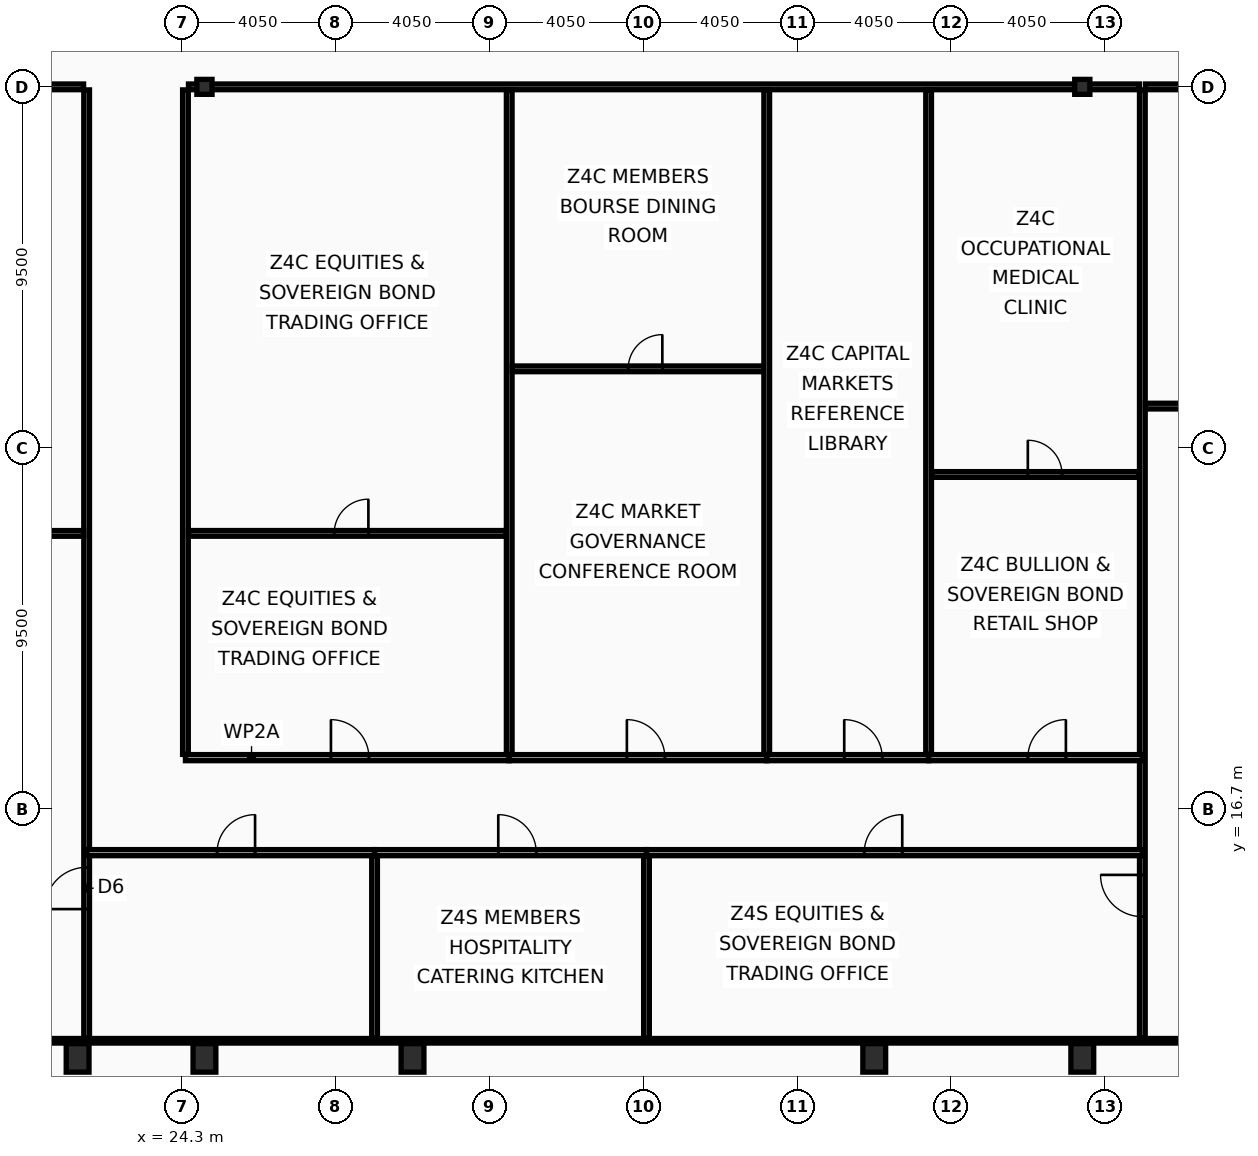
"""IFC4 building model, lengths in metres.
Left out: names, types, materials, properties, quantities, classifications, styles, units other than length and angle.
Written with IfcOpenShell. Run it as: python <this file> out.ifc"""

import sys

from ifc_helpers import new_model, si_unit, direction, frame, frame_2d, origin, origin_2d, place, context, subcontext, project, spatial, rectangle, hollow_rectangle, i_section, extrude, element, fill, save


model = new_model("IFC4")
c1 = context("Model", 3, precision=1e-05, world=origin(), true_north=direction((0.0, 1.0)))
c2 = subcontext(c1, "Body", "Model", "MODEL_VIEW")
j1 = project(units=[si_unit("LENGTHUNIT", "METRE"), si_unit("PLANEANGLEUNIT", "RADIAN")], contexts=[c1])
p1 = place(None, origin())
s1 = spatial("IfcSite", under=j1, at=p1, CompositionType="ELEMENT")
p2 = place(p1, origin())
s2 = spatial("IfcBuilding", under=s1, at=p2, CompositionType="ELEMENT")
p3 = place(p2, frame((0.0, 0.0, 277.0)))
s3 = spatial("IfcBuildingStorey", under=s2, at=p3, CompositionType="ELEMENT", Elevation=277.0)
for number, where, z_axis, x_axis in (
    (1, (21.562, 10.15, 0.0), (0.0, 0.0, 1.0), (1.0, 0.0, 0.0)),
    (2, (24.9, 10.15, 0.0), (0.0, 0.0, 1.0), (1.0, 0.0, 0.0)),
    (3, (30.375, 10.15, 0.0), (0.0, 0.0, 1.0), (1.0, 0.0, 0.0)),
    (4, (42.525, 10.15, 0.0), (0.0, 0.0, 1.0), (1.0, 0.0, 0.0)),
    (5, (48.0, 10.15, 0.0), (0.0, 0.0, 1.0), (1.0, 0.0, 0.0)),
):
    element("IfcColumn", number, at=place(p3, frame(where, z_axis=z_axis, x_axis=x_axis)), inside=s3, PredefinedType="COLUMN", context=c2, shape_type="SweptSolid", body=[
        extrude(hollow_rectangle(XDim=0.6, YDim=0.75, WallThickness=0.045, at=origin_2d()), origin(), (0.0, 0.0, 1.0), 3.6),
    ])
for number, where, z_axis, x_axis in (
    (6, (24.9, 35.7, 0.0), (0.0, 0.0, 1.0), (1.0, 0.0, 0.0)),
    (7, (48.0, 35.7, 0.0), (0.0, 0.0, 1.0), (1.0, 0.0, 0.0)),
):
    element("IfcColumn", number, at=place(p3, frame(where, z_axis=z_axis, x_axis=x_axis)), inside=s3, PredefinedType="COLUMN", context=c2, shape_type="SweptSolid", body=[
        extrude(i_section(OverallWidth=0.399, OverallDepth=0.393, WebThickness=0.023, FlangeThickness=0.037, at=origin_2d()), origin(), (0.0, 0.0, 1.0), 3.6),
    ])
p4 = place(p3, frame((21.8, 10.665, 0.0), z_axis=(0.0, 0.0, 1.0), x_axis=(0.0, 1.0, 0.0)))
e8 = element("IfcWall", 8, at=p4, inside=s3, PredefinedType="PARTITIONING", context=c2, shape_type="SweptSolid", body=[
    extrude(rectangle(XDim=24.955, YDim=0.15, at=frame_2d((12.478, 0.0))), origin(), (0.0, 0.0, 1.0), 3.03),
])
p5 = place(p4, frame((3.4, 0.0, 0.0)))
e9 = element("IfcOpeningElement", 9, at=p5, cuts=e8, PredefinedType="OPENING", context=c2, shape_type="SweptSolid", body=[
    extrude(rectangle(XDim=1.1, YDim=2.1, at=frame_2d((0.55, 1.05))), frame((0.0, 0.085, 0.0), z_axis=(0.0, -1.0, 0.0), x_axis=(1.0, 0.0, 0.0)), (0.0, 0.0, 1.0), 0.17),
])
p6 = place(p3, frame((10.095, 35.7, 0.0), z_axis=(0.0, 0.0, 1.0), x_axis=(1.0, 0.0, 0.0)))
e10 = element("IfcWall", 10, at=p6, inside=s3, PredefinedType="PARTITIONING", context=c2, shape_type="SweptSolid", body=[
    extrude(rectangle(XDim=11.625, YDim=0.15, at=frame_2d((5.812, 0.0))), origin(), (0.0, 0.0, 1.0), 2.78),
])
p7 = place(p6, frame((2.8, 0.0, 0.0)))
e11 = element("IfcOpeningElement", 11, at=p7, cuts=e10, PredefinedType="OPENING", context=c2, shape_type="SweptSolid", body=[
    extrude(rectangle(XDim=1.0, YDim=2.05, at=frame_2d((0.5, 1.025))), frame((0.0, 0.085, 0.0), z_axis=(0.0, -1.0, 0.0), x_axis=(1.0, 0.0, 0.0)), (0.0, 0.0, 1.0), 0.17),
])
p8 = place(p3, frame((10.095, 23.95, 0.0), z_axis=(0.0, 0.0, 1.0), x_axis=(1.0, 0.0, 0.0)))
e12 = element("IfcWall", 12, at=p8, inside=s3, PredefinedType="PARTITIONING", context=c2, shape_type="SweptSolid", body=[
    extrude(rectangle(XDim=11.625, YDim=0.15, at=frame_2d((5.812, 0.0))), origin(), (0.0, 0.0, 1.0), 2.78),
])
p9 = place(p8, frame((2.2, 0.0, 0.0)))
e13 = element("IfcOpeningElement", 13, at=p9, cuts=e12, PredefinedType="OPENING", context=c2, shape_type="SweptSolid", body=[
    extrude(rectangle(XDim=0.9, YDim=2.05, at=frame_2d((0.45, 1.025))), frame((0.0, 0.085, 0.0), z_axis=(0.0, -1.0, 0.0), x_axis=(1.0, 0.0, 0.0)), (0.0, 0.0, 1.0), 0.17),
])
p10 = place(p3, frame((24.4, 18.135, 0.0), z_axis=(0.0, 0.0, 1.0), x_axis=(0.0, 1.0, 0.0)))
e14 = element("IfcWall", 14, at=p10, inside=s3, PredefinedType="PARTITIONING", context=c2, shape_type="SweptSolid", body=[
    extrude(rectangle(XDim=17.485, YDim=0.15, at=frame_2d((8.743, 0.0))), origin(), (0.0, 0.0, 1.0), 2.78),
])
p11 = place(p3, frame((49.58, 10.665, 0.0), z_axis=(0.0, 0.0, 1.0), x_axis=(0.0, 1.0, 0.0)))
e15 = element("IfcWall", 15, at=p11, inside=s3, PredefinedType="PARTITIONING", context=c2, shape_type="SweptSolid", body=[
    extrude(rectangle(XDim=24.955, YDim=0.15, at=frame_2d((12.478, 0.0))), origin(), (0.0, 0.0, 1.0), 3.03),
])
p12 = place(p11, frame((3.2, 0.0, 0.0)))
e16 = element("IfcOpeningElement", 16, at=p12, cuts=e15, PredefinedType="OPENING", context=c2, shape_type="SweptSolid", body=[
    extrude(rectangle(XDim=1.1, YDim=2.1, at=frame_2d((0.55, 1.05))), frame((0.0, 0.085, 0.0), z_axis=(0.0, -1.0, 0.0), x_axis=(1.0, 0.0, 0.0)), (0.0, 0.0, 1.0), 0.17),
])
p13 = place(p3, frame((24.48, 35.7, 0.0), z_axis=(0.0, 0.0, 1.0), x_axis=(1.0, 0.0, 0.0)))
e17 = element("IfcWall", 17, at=p13, inside=s3, PredefinedType="PARTITIONING", context=c2, shape_type="SweptSolid", body=[
    extrude(rectangle(XDim=25.02, YDim=0.15, at=frame_2d((12.51, 0.0))), origin(), (0.0, 0.0, 1.0), 2.78),
])
p14 = place(p3, frame((49.66, 35.7, 0.0), z_axis=(0.0, 0.0, 1.0), x_axis=(1.0, 0.0, 0.0)))
e18 = element("IfcWall", 18, at=p14, inside=s3, PredefinedType="PARTITIONING", context=c2, shape_type="SweptSolid", body=[
    extrude(rectangle(XDim=13.145, YDim=0.15, at=frame_2d((6.573, 0.0))), origin(), (0.0, 0.0, 1.0), 2.78),
])
p15 = place(p14, frame((2.2, 0.0, 0.0)))
e19 = element("IfcOpeningElement", 19, at=p15, cuts=e18, PredefinedType="OPENING", context=c2, shape_type="SweptSolid", body=[
    extrude(rectangle(XDim=1.0, YDim=2.05, at=frame_2d((0.5, 1.025))), frame((0.0, 0.085, 0.0), z_axis=(0.0, -1.0, 0.0), x_axis=(1.0, 0.0, 0.0)), (0.0, 0.0, 1.0), 0.17),
])
p16 = place(p3, frame((49.66, 27.3, 0.0), z_axis=(0.0, 0.0, 1.0), x_axis=(1.0, 0.0, 0.0)))
e20 = element("IfcWall", 20, at=p16, inside=s3, PredefinedType="PARTITIONING", context=c2, shape_type="SweptSolid", body=[
    extrude(rectangle(XDim=13.145, YDim=0.15, at=frame_2d((6.573, 0.0))), origin(), (0.0, 0.0, 1.0), 2.78),
])
p17 = place(p16, frame((2.2, 0.0, 0.0)))
e21 = element("IfcOpeningElement", 21, at=p17, cuts=e20, PredefinedType="OPENING", context=c2, shape_type="SweptSolid", body=[
    extrude(rectangle(XDim=0.9, YDim=2.05, at=frame_2d((0.45, 1.025))), frame((0.0, 0.085, 0.0), z_axis=(0.0, -1.0, 0.0), x_axis=(1.0, 0.0, 0.0)), (0.0, 0.0, 1.0), 0.17),
])
p18 = place(p3, frame((24.4, 18.05, 0.0), z_axis=(0.0, 0.0, 1.0), x_axis=(1.0, 0.0, 0.0)))
e22 = element("IfcWall", 22, at=p18, inside=s3, PredefinedType="PARTITIONING", context=c2, shape_type="SweptSolid", body=[
    extrude(rectangle(XDim=8.52, YDim=0.16, at=frame_2d((4.26, 0.0))), origin(), (0.0, 0.0, 1.0), 2.78),
])
p19 = place(p18, frame((3.828, 0.0, 0.0)))
e23 = element("IfcOpeningElement", 23, at=p19, cuts=e22, PredefinedType="OPENING", context=c2, shape_type="SweptSolid", body=[
    extrude(rectangle(XDim=1.0, YDim=2.05, at=frame_2d((0.5, 1.025))), frame((0.0, 0.09, 0.0), z_axis=(0.0, -1.0, 0.0), x_axis=(1.0, 0.0, 0.0)), (0.0, 0.0, 1.0), 0.18),
])
p20 = place(p3, frame((24.48, 23.951, 0.0), z_axis=(0.0, 0.0, 1.0), x_axis=(1.0, 0.0, 0.0)))
e24 = element("IfcWall", 24, at=p20, inside=s3, PredefinedType="PARTITIONING", context=c2, shape_type="SweptSolid", body=[
    extrude(rectangle(XDim=8.36, YDim=0.15, at=frame_2d((4.18, 0.0))), origin(), (0.0, 0.0, 1.0), 2.78),
])
p21 = place(p20, frame((3.834, 0.0, 0.0)))
e25 = element("IfcOpeningElement", 25, at=p21, cuts=e24, PredefinedType="OPENING", context=c2, shape_type="SweptSolid", body=[
    extrude(rectangle(XDim=0.9, YDim=2.05, at=frame_2d((0.45, 1.025))), frame((0.0, 0.085, 0.0), z_axis=(0.0, -1.0, 0.0), x_axis=(1.0, 0.0, 0.0)), (0.0, 0.0, 1.0), 0.17),
])
p22 = place(p3, frame((32.92, 18.05, 0.0), z_axis=(0.0, 0.0, 1.0), x_axis=(1.0, 0.0, 0.0)))
e26 = element("IfcWall", 26, at=p22, inside=s3, PredefinedType="PARTITIONING", context=c2, shape_type="SweptSolid", body=[
    extrude(rectangle(XDim=6.776, YDim=0.16, at=frame_2d((3.388, 0.0))), origin(), (0.0, 0.0, 1.0), 3.44),
])
p23 = place(p22, frame((3.096, 0.0, 0.0)))
e27 = element("IfcOpeningElement", 27, at=p23, cuts=e26, PredefinedType="OPENING", context=c2, shape_type="SweptSolid", body=[
    extrude(rectangle(XDim=1.0, YDim=2.05, at=frame_2d((0.5, 1.025))), frame((0.0, 0.09, 0.0), z_axis=(0.0, -1.0, 0.0), x_axis=(1.0, 0.0, 0.0)), (0.0, 0.0, 1.0), 0.18),
])
p24 = place(p3, frame((32.92, 18.135, 0.0), z_axis=(0.0, 0.0, 1.0), x_axis=(0.0, 1.0, 0.0)))
e28 = element("IfcWall", 28, at=p24, inside=s3, PredefinedType="PARTITIONING", context=c2, shape_type="SweptSolid", body=[
    extrude(rectangle(XDim=17.485, YDim=0.15, at=frame_2d((8.743, 0.0))), origin(), (0.0, 0.0, 1.0), 3.03),
])
p25 = place(p3, frame((33.0, 28.28, 0.0), z_axis=(0.0, 0.0, 1.0), x_axis=(1.0, 0.0, 0.0)))
e29 = element("IfcWall", 29, at=p25, inside=s3, PredefinedType="PARTITIONING", context=c2, shape_type="SweptSolid", body=[
    extrude(rectangle(XDim=6.616, YDim=0.15, at=frame_2d((3.308, 0.0))), origin(), (0.0, 0.0, 1.0), 3.44),
])
p26 = place(p25, frame((3.049, 0.0, 0.0)))
e30 = element("IfcOpeningElement", 30, at=p26, cuts=e29, PredefinedType="OPENING", context=c2, shape_type="SweptSolid", body=[
    extrude(rectangle(XDim=0.9, YDim=2.05, at=frame_2d((0.45, 1.025))), frame((0.0, 0.085, 0.0), z_axis=(0.0, -1.0, 0.0), x_axis=(1.0, 0.0, 0.0)), (0.0, 0.0, 1.0), 0.17),
])
p27 = place(p3, frame((39.696, 18.05, 0.0), z_axis=(0.0, 0.0, 1.0), x_axis=(1.0, 0.0, 0.0)))
e31 = element("IfcWall", 31, at=p27, inside=s3, PredefinedType="PARTITIONING", context=c2, shape_type="SweptSolid", body=[
    extrude(rectangle(XDim=4.26, YDim=0.16, at=frame_2d((2.13, 0.0))), origin(), (0.0, 0.0, 1.0), 2.78),
])
p28 = place(p27, frame((2.039, 0.0, 0.0)))
e32 = element("IfcOpeningElement", 32, at=p28, cuts=e31, PredefinedType="OPENING", context=c2, shape_type="SweptSolid", body=[
    extrude(rectangle(XDim=1.0, YDim=2.05, at=frame_2d((0.5, 1.025))), frame((0.0, 0.09, 0.0), z_axis=(0.0, -1.0, 0.0), x_axis=(1.0, 0.0, 0.0)), (0.0, 0.0, 1.0), 0.18),
])
p29 = place(p3, frame((39.696, 18.135, 0.0), z_axis=(0.0, 0.0, 1.0), x_axis=(0.0, 1.0, 0.0)))
e33 = element("IfcWall", 33, at=p29, inside=s3, PredefinedType="PARTITIONING", context=c2, shape_type="SweptSolid", body=[
    extrude(rectangle(XDim=17.485, YDim=0.15, at=frame_2d((8.743, 0.0))), origin(), (0.0, 0.0, 1.0), 3.03),
])
p30 = place(p3, frame((43.956, 18.05, 0.0), z_axis=(0.0, 0.0, 1.0), x_axis=(1.0, 0.0, 0.0)))
e34 = element("IfcWall", 34, at=p30, inside=s3, PredefinedType="PARTITIONING", context=c2, shape_type="SweptSolid", body=[
    extrude(rectangle(XDim=5.624, YDim=0.16, at=frame_2d((2.812, 0.0))), origin(), (0.0, 0.0, 1.0), 2.78),
])
p31 = place(p30, frame((2.612, 0.0, 0.0)))
e35 = element("IfcOpeningElement", 35, at=p31, cuts=e34, PredefinedType="OPENING", context=c2, shape_type="SweptSolid", body=[
    extrude(rectangle(XDim=1.0, YDim=2.05, at=frame_2d((0.5, 1.025))), frame((0.0, 0.09, 0.0), z_axis=(0.0, -1.0, 0.0), x_axis=(1.0, 0.0, 0.0)), (0.0, 0.0, 1.0), 0.18),
])
p32 = place(p3, frame((43.956, 18.135, 0.0), z_axis=(0.0, 0.0, 1.0), x_axis=(0.0, 1.0, 0.0)))
e36 = element("IfcWall", 36, at=p32, inside=s3, PredefinedType="PARTITIONING", context=c2, shape_type="SweptSolid", body=[
    extrude(rectangle(XDim=17.485, YDim=0.15, at=frame_2d((8.743, 0.0))), origin(), (0.0, 0.0, 1.0), 3.03),
])
p33 = place(p3, frame((44.036, 25.501, 0.0), z_axis=(0.0, 0.0, 1.0), x_axis=(1.0, 0.0, 0.0)))
e37 = element("IfcWall", 37, at=p33, inside=s3, PredefinedType="PARTITIONING", context=c2, shape_type="SweptSolid", body=[
    extrude(rectangle(XDim=5.464, YDim=0.15, at=frame_2d((2.732, 0.0))), origin(), (0.0, 0.0, 1.0), 2.78),
])
p34 = place(p33, frame((2.531, 0.0, 0.0)))
e38 = element("IfcOpeningElement", 38, at=p34, cuts=e37, PredefinedType="OPENING", context=c2, shape_type="SweptSolid", body=[
    extrude(rectangle(XDim=0.9, YDim=2.05, at=frame_2d((0.45, 1.025))), frame((0.0, 0.085, 0.0), z_axis=(0.0, -1.0, 0.0), x_axis=(1.0, 0.0, 0.0)), (0.0, 0.0, 1.0), 0.17),
])
p35 = place(p3, frame((21.8, 15.55, 0.0), z_axis=(0.0, 0.0, 1.0), x_axis=(1.0, 0.0, 0.0)))
e39 = element("IfcWall", 39, at=p35, inside=s3, PredefinedType="PARTITIONING", context=c2, shape_type="SweptSolid", body=[
    extrude(rectangle(XDim=7.576, YDim=0.16, at=frame_2d((3.788, 0.0))), origin(), (0.0, 0.0, 1.0), 2.78),
])
p36 = place(p35, frame((3.432, 0.0, 0.0)))
e40 = element("IfcOpeningElement", 40, at=p36, cuts=e39, PredefinedType="OPENING", context=c2, shape_type="SweptSolid", body=[
    extrude(rectangle(XDim=1.0, YDim=2.05, at=frame_2d((0.5, 1.025))), frame((0.0, 0.09, 0.0), z_axis=(0.0, -1.0, 0.0), x_axis=(1.0, 0.0, 0.0)), (0.0, 0.0, 1.0), 0.18),
])
p37 = place(p3, frame((29.376, 15.55, 0.0), z_axis=(0.0, 0.0, 1.0), x_axis=(1.0, 0.0, 0.0)))
e41 = element("IfcWall", 41, at=p37, inside=s3, PredefinedType="PARTITIONING", context=c2, shape_type="SweptSolid", body=[
    extrude(rectangle(XDim=7.155, YDim=0.16, at=frame_2d((3.578, 0.0))), origin(), (0.0, 0.0, 1.0), 2.78),
])
p38 = place(p37, frame((3.255, 0.0, 0.0)))
e42 = element("IfcOpeningElement", 42, at=p38, cuts=e41, PredefinedType="OPENING", context=c2, shape_type="SweptSolid", body=[
    extrude(rectangle(XDim=1.0, YDim=2.05, at=frame_2d((0.5, 1.025))), frame((0.0, 0.09, 0.0), z_axis=(0.0, -1.0, 0.0), x_axis=(1.0, 0.0, 0.0)), (0.0, 0.0, 1.0), 0.18),
])
p39 = place(p3, frame((29.376, 10.665, 0.0), z_axis=(0.0, 0.0, 1.0), x_axis=(0.0, 1.0, 0.0)))
e43 = element("IfcWall", 43, at=p39, inside=s3, PredefinedType="PARTITIONING", context=c2, shape_type="SweptSolid", body=[
    extrude(rectangle(XDim=4.8, YDim=0.15, at=frame_2d((2.4, 0.0))), origin(), (0.0, 0.0, 1.0), 3.44),
])
p40 = place(p3, frame((36.532, 15.55, 0.0), z_axis=(0.0, 0.0, 1.0), x_axis=(1.0, 0.0, 0.0)))
e44 = element("IfcWall", 44, at=p40, inside=s3, PredefinedType="PARTITIONING", context=c2, shape_type="SweptSolid", body=[
    extrude(rectangle(XDim=13.048, YDim=0.16, at=frame_2d((6.524, 0.0))), origin(), (0.0, 0.0, 1.0), 2.78),
])
p41 = place(p40, frame((5.73, 0.0, 0.0)))
e45 = element("IfcOpeningElement", 45, at=p41, cuts=e44, PredefinedType="OPENING", context=c2, shape_type="SweptSolid", body=[
    extrude(rectangle(XDim=1.0, YDim=2.05, at=frame_2d((0.5, 1.025))), frame((0.0, 0.09, 0.0), z_axis=(0.0, -1.0, 0.0), x_axis=(1.0, 0.0, 0.0)), (0.0, 0.0, 1.0), 0.18),
])
p42 = place(p3, frame((36.532, 10.665, 0.0), z_axis=(0.0, 0.0, 1.0), x_axis=(0.0, 1.0, 0.0)))
e46 = element("IfcWall", 46, at=p42, inside=s3, PredefinedType="PARTITIONING", context=c2, shape_type="SweptSolid", body=[
    extrude(rectangle(XDim=4.8, YDim=0.15, at=frame_2d((2.4, 0.0))), origin(), (0.0, 0.0, 1.0), 3.44),
])
p43 = place(p3, frame((10.095, 10.6, 0.0), z_axis=(0.0, 0.0, 1.0), x_axis=(1.0, 0.0, 0.0)))
e47 = element("IfcWall", 47, at=p43, inside=s3, PredefinedType="PARTITIONING", context=c2, shape_type="SweptSolid", body=[
    extrude(rectangle(XDim=52.71, YDim=0.12, at=frame_2d((26.355, 0.0))), origin(), (0.0, 0.0, 1.0), 2.78),
])
p44 = place(p5, origin())
e48 = element("IfcDoor", 48, at=p44, inside=s3, OperationType="SINGLE_SWING_LEFT", PredefinedType="DOOR", context=c2, shape_type="SweptSolid", body=[
    extrude(rectangle(XDim=1.1, YDim=2.1, at=frame_2d((0.55, 1.05))), frame((0.0, 0.025, 0.0), z_axis=(0.0, -1.0, 0.0), x_axis=(1.0, 0.0, 0.0)), (0.0, 0.0, 1.0), 0.05),
])
fill(e9, e48)
p45 = place(p12, origin())
e49 = element("IfcDoor", 49, at=p45, inside=s3, OperationType="SINGLE_SWING_RIGHT", PredefinedType="DOOR", context=c2, shape_type="SweptSolid", body=[
    extrude(rectangle(XDim=1.1, YDim=2.1, at=frame_2d((0.55, 1.05))), frame((0.0, 0.025, 0.0), z_axis=(0.0, -1.0, 0.0), x_axis=(1.0, 0.0, 0.0)), (0.0, 0.0, 1.0), 0.05),
])
fill(e16, e49)
p46 = place(p19, origin())
e50 = element("IfcDoor", 50, at=p46, inside=s3, OperationType="SINGLE_SWING_LEFT", PredefinedType="DOOR", context=c2, shape_type="SweptSolid", body=[
    extrude(rectangle(XDim=1.0, YDim=2.05, at=frame_2d((0.5, 1.025))), frame((0.0, 0.025, 0.0), z_axis=(0.0, -1.0, 0.0), x_axis=(1.0, 0.0, 0.0)), (0.0, 0.0, 1.0), 0.05),
])
fill(e23, e50)
p47 = place(p21, origin())
e51 = element("IfcDoor", 51, at=p47, inside=s3, OperationType="SINGLE_SWING_RIGHT", PredefinedType="DOOR", context=c2, shape_type="SweptSolid", body=[
    extrude(rectangle(XDim=0.9, YDim=2.05, at=frame_2d((0.45, 1.025))), frame((0.0, 0.025, 0.0), z_axis=(0.0, -1.0, 0.0), x_axis=(1.0, 0.0, 0.0)), (0.0, 0.0, 1.0), 0.05),
])
fill(e25, e51)
p48 = place(p23, origin())
e52 = element("IfcDoor", 52, at=p48, inside=s3, OperationType="SINGLE_SWING_LEFT", PredefinedType="DOOR", context=c2, shape_type="SweptSolid", body=[
    extrude(rectangle(XDim=1.0, YDim=2.05, at=frame_2d((0.5, 1.025))), frame((0.0, 0.025, 0.0), z_axis=(0.0, -1.0, 0.0), x_axis=(1.0, 0.0, 0.0)), (0.0, 0.0, 1.0), 0.05),
])
fill(e27, e52)
p49 = place(p26, origin())
e53 = element("IfcDoor", 53, at=p49, inside=s3, OperationType="SINGLE_SWING_RIGHT", PredefinedType="DOOR", context=c2, shape_type="SweptSolid", body=[
    extrude(rectangle(XDim=0.9, YDim=2.05, at=frame_2d((0.45, 1.025))), frame((0.0, 0.025, 0.0), z_axis=(0.0, -1.0, 0.0), x_axis=(1.0, 0.0, 0.0)), (0.0, 0.0, 1.0), 0.05),
])
fill(e30, e53)
p50 = place(p28, origin())
e54 = element("IfcDoor", 54, at=p50, inside=s3, OperationType="SINGLE_SWING_LEFT", PredefinedType="DOOR", context=c2, shape_type="SweptSolid", body=[
    extrude(rectangle(XDim=1.0, YDim=2.05, at=frame_2d((0.5, 1.025))), frame((0.0, 0.025, 0.0), z_axis=(0.0, -1.0, 0.0), x_axis=(1.0, 0.0, 0.0)), (0.0, 0.0, 1.0), 0.05),
])
fill(e32, e54)
p51 = place(p31, origin())
e55 = element("IfcDoor", 55, at=p51, inside=s3, OperationType="SINGLE_SWING_RIGHT", PredefinedType="DOOR", context=c2, shape_type="SweptSolid", body=[
    extrude(rectangle(XDim=1.0, YDim=2.05, at=frame_2d((0.5, 1.025))), frame((0.0, 0.025, 0.0), z_axis=(0.0, -1.0, 0.0), x_axis=(1.0, 0.0, 0.0)), (0.0, 0.0, 1.0), 0.05),
])
fill(e35, e55)
p52 = place(p34, origin())
e56 = element("IfcDoor", 56, at=p52, inside=s3, OperationType="SINGLE_SWING_LEFT", PredefinedType="DOOR", context=c2, shape_type="SweptSolid", body=[
    extrude(rectangle(XDim=0.9, YDim=2.05, at=frame_2d((0.45, 1.025))), frame((0.0, 0.025, 0.0), z_axis=(0.0, -1.0, 0.0), x_axis=(1.0, 0.0, 0.0)), (0.0, 0.0, 1.0), 0.05),
])
fill(e38, e56)
p53 = place(p36, origin())
e57 = element("IfcDoor", 57, at=p53, inside=s3, OperationType="SINGLE_SWING_RIGHT", PredefinedType="DOOR", context=c2, shape_type="SweptSolid", body=[
    extrude(rectangle(XDim=1.0, YDim=2.05, at=frame_2d((0.5, 1.025))), frame((0.0, 0.025, 0.0), z_axis=(0.0, -1.0, 0.0), x_axis=(1.0, 0.0, 0.0)), (0.0, 0.0, 1.0), 0.05),
])
fill(e40, e57)
p54 = place(p38, origin())
e58 = element("IfcDoor", 58, at=p54, inside=s3, OperationType="SINGLE_SWING_LEFT", PredefinedType="DOOR", context=c2, shape_type="SweptSolid", body=[
    extrude(rectangle(XDim=1.0, YDim=2.05, at=frame_2d((0.5, 1.025))), frame((0.0, 0.025, 0.0), z_axis=(0.0, -1.0, 0.0), x_axis=(1.0, 0.0, 0.0)), (0.0, 0.0, 1.0), 0.05),
])
fill(e42, e58)
p55 = place(p41, origin())
e59 = element("IfcDoor", 59, at=p55, inside=s3, OperationType="SINGLE_SWING_RIGHT", PredefinedType="DOOR", context=c2, shape_type="SweptSolid", body=[
    extrude(rectangle(XDim=1.0, YDim=2.05, at=frame_2d((0.5, 1.025))), frame((0.0, 0.025, 0.0), z_axis=(0.0, -1.0, 0.0), x_axis=(1.0, 0.0, 0.0)), (0.0, 0.0, 1.0), 0.05),
])
fill(e45, e59)
save(model, sys.argv[1])
